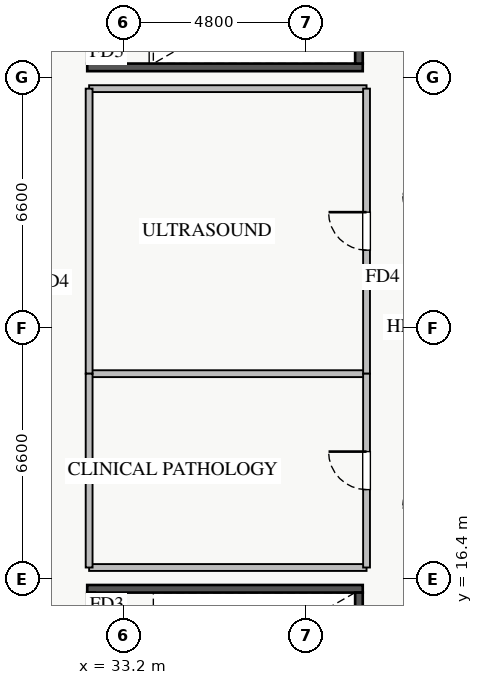
"""IFC4 building model, lengths in metres.
Left out: names, types, materials, properties, quantities, classifications, styles, units other than length and angle.
Written with IfcOpenShell. Run it as: python <this file> out.ifc"""

import sys

from ifc_helpers import new_model, si_unit, direction, frame, frame_2d, origin, place, context, subcontext, project, spatial, rectangle, extrude, source, transform, mapped, element, fill, save


model = new_model("IFC4")
c1 = context("Model", 3, precision=1e-05, world=origin(), true_north=direction((0.0, 1.0)))
c2 = subcontext(c1, "Body", "Model", "MODEL_VIEW")
j1 = project(units=[si_unit("LENGTHUNIT", "METRE"), si_unit("PLANEANGLEUNIT", "RADIAN")], contexts=[c1])
p1 = place(None, origin())
s1 = spatial("IfcSite", under=j1, at=p1, CompositionType="ELEMENT")
p2 = place(p1, origin())
s2 = spatial("IfcBuilding", under=s1, at=p2, CompositionType="ELEMENT")
p3 = place(p2, frame((0.0, 0.0, 18.2)))
s3 = spatial("IfcBuildingStorey", under=s2, at=p3, CompositionType="ELEMENT", Elevation=18.2)
p4 = place(p3, frame((32.25, 29.86, 0.0), z_axis=(0.0, 0.0, 1.0), x_axis=(1.0, 0.0, 0.0)))
e1 = element("IfcWall", 1, at=p4, inside=s3, PredefinedType="SHEAR", context=c2, shape_type="SweptSolid", body=[
    extrude(rectangle(XDim=7.25, YDim=0.2, at=frame_2d((3.625, 0.0))), origin(), (0.0, 0.0, 1.0), 4.8),
])
p5 = place(p3, frame((32.35, 29.96, 0.0), z_axis=(0.0, 0.0, 1.0), x_axis=(0.0, 1.0, 0.0)))
e2 = element("IfcWall", 2, at=p5, inside=s3, PredefinedType="SHEAR", context=c2, shape_type="SweptSolid", body=[
    extrude(rectangle(XDim=3.04, YDim=0.2, at=frame_2d((1.52, 0.0))), origin(), (0.0, 0.0, 1.0), 4.8),
])
p6 = place(p5, frame((0.95, 0.0, 0.0)))
e3 = element("IfcOpeningElement", 3, at=p6, cuts=e2, PredefinedType="OPENING", context=c2, shape_type="SweptSolid", body=[
    extrude(rectangle(XDim=1.1, YDim=2.05, at=frame_2d((0.55, 1.025))), frame((0.0, 0.11, 0.0), z_axis=(0.0, -1.0, 0.0), x_axis=(1.0, 0.0, 0.0)), (0.0, 0.0, 1.0), 0.22),
])
p7 = place(p3, frame((39.4, 29.96, 0.0), z_axis=(0.0, 0.0, 1.0), x_axis=(0.0, 1.0, 0.0)))
e4 = element("IfcWall", 4, at=p7, inside=s3, PredefinedType="SHEAR", context=c2, shape_type="SweptSolid", body=[
    extrude(rectangle(XDim=3.04, YDim=0.2, at=frame_2d((1.52, 0.0))), origin(), (0.0, 0.0, 1.0), 4.8),
])
p8 = place(p3, frame((32.25, 16.14, 0.0), z_axis=(0.0, 0.0, 1.0), x_axis=(1.0, 0.0, 0.0)))
e5 = element("IfcWall", 5, at=p8, inside=s3, PredefinedType="SHEAR", context=c2, shape_type="SweptSolid", body=[
    extrude(rectangle(XDim=7.25, YDim=0.2, at=frame_2d((3.625, 0.0))), origin(), (0.0, 0.0, 1.0), 4.8),
])
p9 = place(p3, frame((32.35, 13.0, 0.0), z_axis=(0.0, 0.0, 1.0), x_axis=(0.0, 1.0, 0.0)))
e6 = element("IfcWall", 6, at=p9, inside=s3, PredefinedType="SHEAR", context=c2, shape_type="SweptSolid", body=[
    extrude(rectangle(XDim=3.04, YDim=0.2, at=frame_2d((1.52, 0.0))), origin(), (0.0, 0.0, 1.0), 4.8),
])
p10 = place(p9, frame((0.95, 0.0, 0.0)))
e7 = element("IfcOpeningElement", 7, at=p10, cuts=e6, PredefinedType="OPENING", context=c2, shape_type="SweptSolid", body=[
    extrude(rectangle(XDim=1.1, YDim=2.05, at=frame_2d((0.55, 1.025))), frame((0.0, 0.11, 0.0), z_axis=(0.0, -1.0, 0.0), x_axis=(1.0, 0.0, 0.0)), (0.0, 0.0, 1.0), 0.22),
])
p11 = place(p3, frame((39.4, 13.0, 0.0), z_axis=(0.0, 0.0, 1.0), x_axis=(0.0, 1.0, 0.0)))
e8 = element("IfcWall", 8, at=p11, inside=s3, PredefinedType="SHEAR", context=c2, shape_type="SweptSolid", body=[
    extrude(rectangle(XDim=3.04, YDim=0.2, at=frame_2d((1.52, 0.0))), origin(), (0.0, 0.0, 1.0), 4.8),
])
p12 = place(p3, frame((32.3, 21.8, 0.0), z_axis=(0.0, 0.0, 1.0), x_axis=(1.0, 0.0, 0.0)))
e9 = element("IfcWall", 9, at=p12, inside=s3, PredefinedType="PARTITIONING", context=c2, shape_type="SweptSolid", body=[
    extrude(rectangle(XDim=7.3, YDim=0.18, at=frame_2d((3.65, 0.0))), origin(), (0.0, 0.0, 1.0), 4.62),
])
p13 = place(p3, frame((32.3, 29.3, 0.0), z_axis=(0.0, 0.0, 1.0), x_axis=(1.0, 0.0, 0.0)))
e10 = element("IfcWall", 10, at=p13, inside=s3, PredefinedType="PARTITIONING", context=c2, shape_type="SweptSolid", body=[
    extrude(rectangle(XDim=7.3, YDim=0.18, at=frame_2d((3.65, 0.0))), origin(), (0.0, 0.0, 1.0), 3.915),
])
p14 = place(p3, frame((32.3, 21.8, 0.0), z_axis=(0.0, 0.0, 1.0), x_axis=(0.0, 1.0, 0.0)))
e11 = element("IfcWall", 11, at=p14, inside=s3, PredefinedType="PARTITIONING", context=c2, shape_type="SweptSolid", body=[
    extrude(rectangle(XDim=7.5, YDim=0.18, at=frame_2d((3.75, 0.0))), origin(), (0.0, 0.0, 1.0), 4.62),
])
p15 = place(p3, frame((39.6, 21.8, 0.0), z_axis=(0.0, 0.0, 1.0), x_axis=(0.0, 1.0, 0.0)))
e12 = element("IfcWall", 12, at=p15, inside=s3, PredefinedType="PARTITIONING", context=c2, shape_type="SweptSolid", body=[
    extrude(rectangle(XDim=7.5, YDim=0.18, at=frame_2d((3.75, 0.0))), origin(), (0.0, 0.0, 1.0), 4.62),
])
p16 = place(p15, frame((3.25, 0.0, 0.0)))
e13 = element("IfcOpeningElement", 13, at=p16, cuts=e12, PredefinedType="OPENING", context=c2, shape_type="SweptSolid", body=[
    extrude(rectangle(XDim=1.0, YDim=2.05, at=frame_2d((0.5, 1.025))), frame((0.0, 0.1, 0.0), z_axis=(0.0, -1.0, 0.0), x_axis=(1.0, 0.0, 0.0)), (0.0, 0.0, 1.0), 0.2),
])
p17 = place(p3, frame((32.3, 16.7, 0.0), z_axis=(0.0, 0.0, 1.0), x_axis=(1.0, 0.0, 0.0)))
e14 = element("IfcWall", 14, at=p17, inside=s3, PredefinedType="PARTITIONING", context=c2, shape_type="SweptSolid", body=[
    extrude(rectangle(XDim=7.3, YDim=0.18, at=frame_2d((3.65, 0.0))), origin(), (0.0, 0.0, 1.0), 3.915),
])
p18 = place(p3, frame((32.3, 16.7, 0.0), z_axis=(0.0, 0.0, 1.0), x_axis=(0.0, 1.0, 0.0)))
e15 = element("IfcWall", 15, at=p18, inside=s3, PredefinedType="PARTITIONING", context=c2, shape_type="SweptSolid", body=[
    extrude(rectangle(XDim=5.1, YDim=0.18, at=frame_2d((2.55, 0.0))), origin(), (0.0, 0.0, 1.0), 4.62),
])
p19 = place(p3, frame((39.6, 16.7, 0.0), z_axis=(0.0, 0.0, 1.0), x_axis=(0.0, 1.0, 0.0)))
e16 = element("IfcWall", 16, at=p19, inside=s3, PredefinedType="PARTITIONING", context=c2, shape_type="SweptSolid", body=[
    extrude(rectangle(XDim=5.1, YDim=0.18, at=frame_2d((2.55, 0.0))), origin(), (0.0, 0.0, 1.0), 4.62),
])
p20 = place(p19, frame((2.05, 0.0, 0.0)))
e17 = element("IfcOpeningElement", 17, at=p20, cuts=e16, PredefinedType="OPENING", context=c2, shape_type="SweptSolid", body=[
    extrude(rectangle(XDim=1.0, YDim=2.05, at=frame_2d((0.5, 1.025))), frame((0.0, 0.1, 0.0), z_axis=(0.0, -1.0, 0.0), x_axis=(1.0, 0.0, 0.0)), (0.0, 0.0, 1.0), 0.2),
])
m1 = source(origin(), c2, "Body", "SweptSolid", [
    extrude(rectangle(XDim=1.0, YDim=2.05, at=frame_2d((0.5, 1.025))), frame((0.0, 0.025, 0.0), z_axis=(0.0, -1.0, 0.0), x_axis=(1.0, 0.0, 0.0)), (0.0, 0.0, 1.0), 0.05),
])
p21 = place(p16, origin())
e18 = element("IfcDoor", 18, at=p21, inside=s3, OperationType="SINGLE_SWING_RIGHT", PredefinedType="DOOR", context=c2, shape_type="MappedRepresentation", body=[
    mapped(m1, transform((0.0, 0.0, 0.0), x_axis=(1.0, 0.0, 0.0), y_axis=(0.0, 1.0, 0.0), z_axis=(0.0, 0.0, 1.0), scale=1.0)),
])
fill(e13, e18)
p22 = place(p20, origin())
e19 = element("IfcDoor", 19, at=p22, inside=s3, OperationType="SINGLE_SWING_RIGHT", PredefinedType="DOOR", context=c2, shape_type="MappedRepresentation", body=[
    mapped(m1, transform((0.0, 0.0, 0.0), x_axis=(1.0, 0.0, 0.0), y_axis=(0.0, 1.0, 0.0), z_axis=(0.0, 0.0, 1.0), scale=1.0)),
])
fill(e17, e19)
save(model, sys.argv[1])
